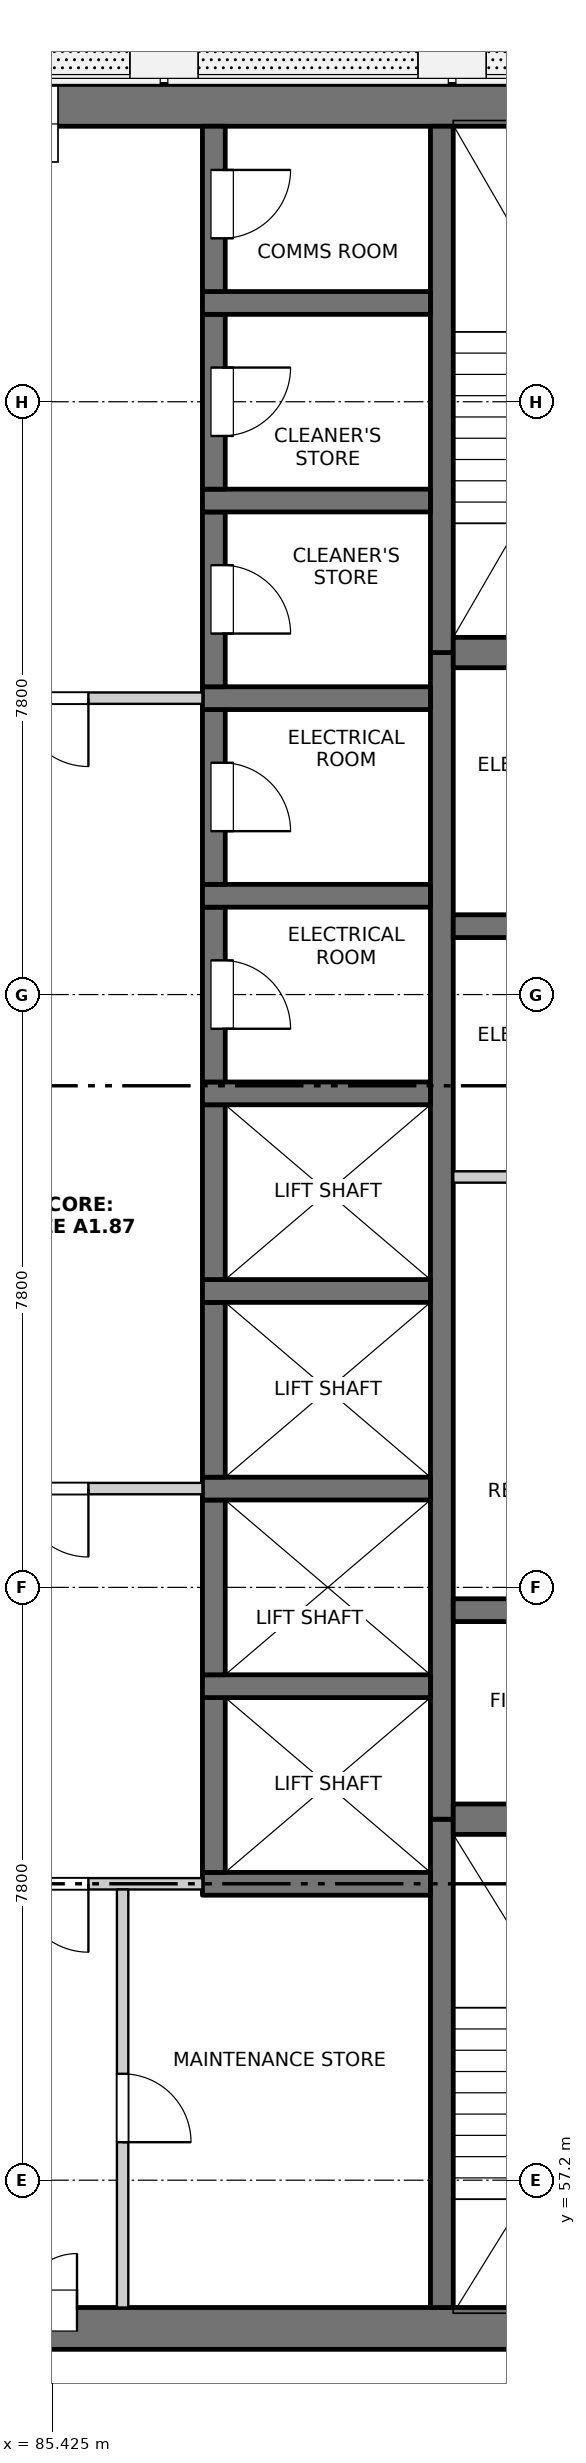
"""IFC4 building model, lengths in metres.
Left out: names, types, materials, properties, quantities, classifications, styles, units other than length and angle.
Written with IfcOpenShell. Run it as: python <this file> out.ifc"""

import sys

from ifc_helpers import new_model, si_unit, direction, frame, frame_2d, origin, place, context, subcontext, project, spatial, rectangle, extrude, element, fill, save


model = new_model("IFC4")
c1 = context("Model", 3, precision=1e-05, world=origin(), true_north=direction((0.0, 1.0)))
c2 = subcontext(c1, "Body", "Model", "MODEL_VIEW")
j1 = project(units=[si_unit("LENGTHUNIT", "METRE"), si_unit("PLANEANGLEUNIT", "RADIAN")], contexts=[c1])
p1 = place(None, origin())
s1 = spatial("IfcSite", under=j1, at=p1, CompositionType="ELEMENT")
p2 = place(p1, origin())
s2 = spatial("IfcBuilding", under=s1, at=p2, CompositionType="ELEMENT")
p3 = place(p2, frame((0.0, 0.0, 127.1)))
s3 = spatial("IfcBuildingStorey", under=s2, at=p3, CompositionType="ELEMENT", Elevation=127.1)
p4 = place(p3, frame((75.525, 55.25, -0.25), z_axis=(0.0, 0.0, 1.0), x_axis=(1.0, 0.0, 0.0)))
e1 = element("IfcWall", 1, at=p4, inside=s3, PredefinedType="SOLIDWALL", context=c2, shape_type="SweptSolid", body=[
    extrude(rectangle(XDim=18.95, YDim=0.55, at=frame_2d((9.475, 0.0))), origin(), (0.0, 0.0, 1.0), 3.4),
])
p5 = place(p4, frame((8.725, 0.0, 0.25)))
e2 = element("IfcOpeningElement", 2, at=p5, cuts=e1, PredefinedType="OPENING", context=c2, shape_type="SweptSolid", body=[
    extrude(rectangle(XDim=1.5, YDim=2.1, at=frame_2d((0.75, 1.05))), frame((0.0, 0.285, 0.0), z_axis=(0.0, -1.0, 0.0), x_axis=(1.0, 0.0, 0.0)), (0.0, 0.0, 1.0), 0.57),
])
p6 = place(p3, frame((75.525, 84.5, -0.25), z_axis=(0.0, 0.0, 1.0), x_axis=(1.0, 0.0, 0.0)))
e3 = element("IfcWall", 3, at=p6, inside=s3, PredefinedType="SOLIDWALL", context=c2, shape_type="SweptSolid", body=[
    extrude(rectangle(XDim=18.95, YDim=0.55, at=frame_2d((9.475, 0.0))), origin(), (0.0, 0.0, 1.0), 3.4),
])
p7 = place(p3, frame((90.55, 55.525, -0.25), z_axis=(0.0, 0.0, 1.0), x_axis=(0.0, 1.0, 0.0)))
e4 = element("IfcWall", 4, at=p7, inside=s3, PredefinedType="SOLIDWALL", context=c2, shape_type="SweptSolid", body=[
    extrude(rectangle(XDim=6.425, YDim=0.3, at=frame_2d((3.212, 0.0))), origin(), (0.0, 0.0, 1.0), 3.4),
])
p8 = place(p3, frame((90.55, 61.95, -0.25), z_axis=(0.0, 0.0, 1.0), x_axis=(0.0, 1.0, 0.0)))
e5 = element("IfcWall", 5, at=p8, inside=s3, PredefinedType="SOLIDWALL", context=c2, shape_type="SweptSolid", body=[
    extrude(rectangle(XDim=15.35, YDim=0.3, at=frame_2d((7.675, 0.0))), origin(), (0.0, 0.0, 1.0), 3.4),
])
p9 = place(p3, frame((90.55, 77.3, -0.25), z_axis=(0.0, 0.0, 1.0), x_axis=(0.0, 1.0, 0.0)))
e6 = element("IfcWall", 6, at=p9, inside=s3, PredefinedType="SOLIDWALL", context=c2, shape_type="SweptSolid", body=[
    extrude(rectangle(XDim=6.925, YDim=0.3, at=frame_2d((3.462, 0.0))), origin(), (0.0, 0.0, 1.0), 3.4),
])
p10 = place(p3, frame((87.4, 61.1, -0.25), z_axis=(0.0, 0.0, 1.0), x_axis=(1.0, 0.0, 0.0)))
e7 = element("IfcWall", 7, at=p10, inside=s3, PredefinedType="SOLIDWALL", context=c2, shape_type="SweptSolid", body=[
    extrude(rectangle(XDim=3.0, YDim=0.3, at=frame_2d((1.5, 0.0))), origin(), (0.0, 0.0, 1.0), 3.4),
])
p11 = place(p3, frame((87.55, 61.25, -0.25), z_axis=(0.0, 0.0, 1.0), x_axis=(0.0, 1.0, 0.0)))
e8 = element("IfcWall", 8, at=p11, inside=s3, PredefinedType="SOLIDWALL", context=c2, shape_type="SweptSolid", body=[
    extrude(rectangle(XDim=2.3, YDim=0.3, at=frame_2d((1.15, 0.0))), origin(), (0.0, 0.0, 1.0), 3.4),
])
p12 = place(p3, frame((87.4, 63.7, -0.25), z_axis=(0.0, 0.0, 1.0), x_axis=(1.0, 0.0, 0.0)))
e9 = element("IfcWall", 9, at=p12, inside=s3, PredefinedType="SOLIDWALL", context=c2, shape_type="SweptSolid", body=[
    extrude(rectangle(XDim=3.0, YDim=0.3, at=frame_2d((1.5, 0.0))), origin(), (0.0, 0.0, 1.0), 3.4),
])
p13 = place(p3, frame((87.55, 63.85, -0.25), z_axis=(0.0, 0.0, 1.0), x_axis=(0.0, 1.0, 0.0)))
e10 = element("IfcWall", 10, at=p13, inside=s3, PredefinedType="SOLIDWALL", context=c2, shape_type="SweptSolid", body=[
    extrude(rectangle(XDim=2.3, YDim=0.3, at=frame_2d((1.15, 0.0))), origin(), (0.0, 0.0, 1.0), 3.4),
])
p14 = place(p3, frame((87.4, 66.3, -0.25), z_axis=(0.0, 0.0, 1.0), x_axis=(1.0, 0.0, 0.0)))
e11 = element("IfcWall", 11, at=p14, inside=s3, PredefinedType="SOLIDWALL", context=c2, shape_type="SweptSolid", body=[
    extrude(rectangle(XDim=3.0, YDim=0.3, at=frame_2d((1.5, 0.0))), origin(), (0.0, 0.0, 1.0), 3.4),
])
p15 = place(p3, frame((87.55, 66.45, -0.25), z_axis=(0.0, 0.0, 1.0), x_axis=(0.0, 1.0, 0.0)))
e12 = element("IfcWall", 12, at=p15, inside=s3, PredefinedType="SOLIDWALL", context=c2, shape_type="SweptSolid", body=[
    extrude(rectangle(XDim=2.3, YDim=0.3, at=frame_2d((1.15, 0.0))), origin(), (0.0, 0.0, 1.0), 3.4),
])
p16 = place(p3, frame((87.4, 68.9, -0.25), z_axis=(0.0, 0.0, 1.0), x_axis=(1.0, 0.0, 0.0)))
e13 = element("IfcWall", 13, at=p16, inside=s3, PredefinedType="SOLIDWALL", context=c2, shape_type="SweptSolid", body=[
    extrude(rectangle(XDim=3.0, YDim=0.3, at=frame_2d((1.5, 0.0))), origin(), (0.0, 0.0, 1.0), 3.4),
])
p17 = place(p3, frame((87.55, 69.05, -0.25), z_axis=(0.0, 0.0, 1.0), x_axis=(0.0, 1.0, 0.0)))
e14 = element("IfcWall", 14, at=p17, inside=s3, PredefinedType="SOLIDWALL", context=c2, shape_type="SweptSolid", body=[
    extrude(rectangle(XDim=2.3, YDim=0.3, at=frame_2d((1.15, 0.0))), origin(), (0.0, 0.0, 1.0), 3.4),
])
p18 = place(p3, frame((87.4, 71.5, -0.25), z_axis=(0.0, 0.0, 1.0), x_axis=(1.0, 0.0, 0.0)))
e15 = element("IfcWall", 15, at=p18, inside=s3, PredefinedType="SOLIDWALL", context=c2, shape_type="SweptSolid", body=[
    extrude(rectangle(XDim=3.0, YDim=0.3, at=frame_2d((1.5, 0.0))), origin(), (0.0, 0.0, 1.0), 3.4),
])
p19 = place(p3, frame((87.55, 71.65, -0.25), z_axis=(0.0, 0.0, 1.0), x_axis=(0.0, 1.0, 0.0)))
e16 = element("IfcWall", 16, at=p19, inside=s3, PredefinedType="SOLIDWALL", context=c2, shape_type="SweptSolid", body=[
    extrude(rectangle(XDim=2.3, YDim=0.3, at=frame_2d((1.15, 0.0))), origin(), (0.0, 0.0, 1.0), 3.4),
])
p20 = place(p19, frame((0.7, 0.0, 0.25)))
e17 = element("IfcOpeningElement", 17, at=p20, cuts=e16, PredefinedType="OPENING", context=c2, shape_type="SweptSolid", body=[
    extrude(rectangle(XDim=0.9, YDim=2.1, at=frame_2d((0.45, 1.05))), frame((0.0, 0.16, 0.0), z_axis=(0.0, -1.0, 0.0), x_axis=(1.0, 0.0, 0.0)), (0.0, 0.0, 1.0), 0.32),
])
p21 = place(p3, frame((87.4, 74.1, -0.25), z_axis=(0.0, 0.0, 1.0), x_axis=(1.0, 0.0, 0.0)))
e18 = element("IfcWall", 18, at=p21, inside=s3, PredefinedType="SOLIDWALL", context=c2, shape_type="SweptSolid", body=[
    extrude(rectangle(XDim=3.0, YDim=0.3, at=frame_2d((1.5, 0.0))), origin(), (0.0, 0.0, 1.0), 3.4),
])
p22 = place(p3, frame((87.55, 74.25, -0.25), z_axis=(0.0, 0.0, 1.0), x_axis=(0.0, 1.0, 0.0)))
e19 = element("IfcWall", 19, at=p22, inside=s3, PredefinedType="SOLIDWALL", context=c2, shape_type="SweptSolid", body=[
    extrude(rectangle(XDim=2.3, YDim=0.3, at=frame_2d((1.15, 0.0))), origin(), (0.0, 0.0, 1.0), 3.4),
])
p23 = place(p22, frame((0.7, 0.0, 0.25)))
e20 = element("IfcOpeningElement", 20, at=p23, cuts=e19, PredefinedType="OPENING", context=c2, shape_type="SweptSolid", body=[
    extrude(rectangle(XDim=0.9, YDim=2.1, at=frame_2d((0.45, 1.05))), frame((0.0, 0.16, 0.0), z_axis=(0.0, -1.0, 0.0), x_axis=(1.0, 0.0, 0.0)), (0.0, 0.0, 1.0), 0.32),
])
p24 = place(p3, frame((87.4, 76.7, -0.25), z_axis=(0.0, 0.0, 1.0), x_axis=(1.0, 0.0, 0.0)))
e21 = element("IfcWall", 21, at=p24, inside=s3, PredefinedType="SOLIDWALL", context=c2, shape_type="SweptSolid", body=[
    extrude(rectangle(XDim=3.0, YDim=0.3, at=frame_2d((1.5, 0.0))), origin(), (0.0, 0.0, 1.0), 3.4),
])
p25 = place(p3, frame((87.55, 76.85, -0.25), z_axis=(0.0, 0.0, 1.0), x_axis=(0.0, 1.0, 0.0)))
e22 = element("IfcWall", 22, at=p25, inside=s3, PredefinedType="SOLIDWALL", context=c2, shape_type="SweptSolid", body=[
    extrude(rectangle(XDim=2.3, YDim=0.3, at=frame_2d((1.15, 0.0))), origin(), (0.0, 0.0, 1.0), 3.4),
])
p26 = place(p25, frame((0.7, 0.0, 0.25)))
e23 = element("IfcOpeningElement", 23, at=p26, cuts=e22, PredefinedType="OPENING", context=c2, shape_type="SweptSolid", body=[
    extrude(rectangle(XDim=0.9, YDim=2.1, at=frame_2d((0.45, 1.05))), frame((0.0, 0.16, 0.0), z_axis=(0.0, -1.0, 0.0), x_axis=(1.0, 0.0, 0.0)), (0.0, 0.0, 1.0), 0.32),
])
p27 = place(p3, frame((87.4, 79.3, -0.25), z_axis=(0.0, 0.0, 1.0), x_axis=(1.0, 0.0, 0.0)))
e24 = element("IfcWall", 24, at=p27, inside=s3, PredefinedType="SOLIDWALL", context=c2, shape_type="SweptSolid", body=[
    extrude(rectangle(XDim=3.0, YDim=0.3, at=frame_2d((1.5, 0.0))), origin(), (0.0, 0.0, 1.0), 3.4),
])
p28 = place(p3, frame((87.55, 79.45, -0.25), z_axis=(0.0, 0.0, 1.0), x_axis=(0.0, 1.0, 0.0)))
e25 = element("IfcWall", 25, at=p28, inside=s3, PredefinedType="SOLIDWALL", context=c2, shape_type="SweptSolid", body=[
    extrude(rectangle(XDim=2.3, YDim=0.3, at=frame_2d((1.15, 0.0))), origin(), (0.0, 0.0, 1.0), 3.4),
])
p29 = place(p28, frame((0.7, 0.0, 0.25)))
e26 = element("IfcOpeningElement", 26, at=p29, cuts=e25, PredefinedType="OPENING", context=c2, shape_type="SweptSolid", body=[
    extrude(rectangle(XDim=0.9, YDim=2.1, at=frame_2d((0.45, 1.05))), frame((0.0, 0.16, 0.0), z_axis=(0.0, -1.0, 0.0), x_axis=(1.0, 0.0, 0.0)), (0.0, 0.0, 1.0), 0.32),
])
p30 = place(p3, frame((87.4, 81.9, -0.25), z_axis=(0.0, 0.0, 1.0), x_axis=(1.0, 0.0, 0.0)))
e27 = element("IfcWall", 27, at=p30, inside=s3, PredefinedType="SOLIDWALL", context=c2, shape_type="SweptSolid", body=[
    extrude(rectangle(XDim=3.0, YDim=0.3, at=frame_2d((1.5, 0.0))), origin(), (0.0, 0.0, 1.0), 3.4),
])
p31 = place(p3, frame((87.55, 82.05, -0.25), z_axis=(0.0, 0.0, 1.0), x_axis=(0.0, 1.0, 0.0)))
e28 = element("IfcWall", 28, at=p31, inside=s3, PredefinedType="SOLIDWALL", context=c2, shape_type="SweptSolid", body=[
    extrude(rectangle(XDim=2.175, YDim=0.3, at=frame_2d((1.087, 0.0))), origin(), (0.0, 0.0, 1.0), 3.4),
])
p32 = place(p31, frame((0.7, 0.0, 0.25)))
e29 = element("IfcOpeningElement", 29, at=p32, cuts=e28, PredefinedType="OPENING", context=c2, shape_type="SweptSolid", body=[
    extrude(rectangle(XDim=0.9, YDim=2.1, at=frame_2d((0.45, 1.05))), frame((0.0, 0.16, 0.0), z_axis=(0.0, -1.0, 0.0), x_axis=(1.0, 0.0, 0.0)), (0.0, 0.0, 1.0), 0.32),
])
p33 = place(p3, frame((90.7, 61.95, -0.25), z_axis=(0.0, 0.0, 1.0), x_axis=(1.0, 0.0, 0.0)))
e30 = element("IfcWall", 30, at=p33, inside=s3, PredefinedType="SOLIDWALL", context=c2, shape_type="SweptSolid", body=[
    extrude(rectangle(XDim=3.775, YDim=0.4, at=frame_2d((1.888, 0.0))), origin(), (0.0, 0.0, 1.0), 3.4),
])
for number, where, z_axis, x_axis in (
    (31, (90.7, 64.7, -0.25), (0.0, 0.0, 1.0), (1.0, 0.0, 0.0)),
    (32, (90.7, 73.7, -0.25), (0.0, 0.0, 1.0), (1.0, 0.0, 0.0)),
):
    element("IfcWall", number, at=place(p3, frame(where, z_axis=z_axis, x_axis=x_axis)), inside=s3, PredefinedType="SOLIDWALL", context=c2, shape_type="SweptSolid", body=[
        extrude(rectangle(XDim=3.775, YDim=0.3, at=frame_2d((1.888, 0.0))), origin(), (0.0, 0.0, 1.0), 3.4),
    ])
p34 = place(p3, frame((90.7, 77.3, -0.25), z_axis=(0.0, 0.0, 1.0), x_axis=(1.0, 0.0, 0.0)))
e33 = element("IfcWall", 33, at=p34, inside=s3, PredefinedType="SOLIDWALL", context=c2, shape_type="SweptSolid", body=[
    extrude(rectangle(XDim=3.775, YDim=0.4, at=frame_2d((1.888, 0.0))), origin(), (0.0, 0.0, 1.0), 3.4),
])
p35 = place(p3, frame((82.6, 61.1, 0.0), z_axis=(0.0, 0.0, 1.0), x_axis=(1.0, 0.0, 0.0)))
e34 = element("IfcWall", 34, at=p35, inside=s3, PredefinedType="PARTITIONING", context=c2, shape_type="SweptSolid", body=[
    extrude(rectangle(XDim=4.8, YDim=0.15, at=frame_2d((2.4, 0.0))), origin(), (0.0, 0.0, 1.0), 3.15),
])
p36 = place(p35, frame((1.5, 0.0, 0.0)))
e35 = element("IfcOpeningElement", 35, at=p36, cuts=e34, PredefinedType="OPENING", context=c2, shape_type="SweptSolid", body=[
    extrude(rectangle(XDim=1.8, YDim=2.1, at=frame_2d((0.9, 1.05))), frame((0.0, 0.085, 0.0), z_axis=(0.0, -1.0, 0.0), x_axis=(1.0, 0.0, 0.0)), (0.0, 0.0, 1.0), 0.17),
])
p37 = place(p3, frame((82.6, 66.3, 0.0), z_axis=(0.0, 0.0, 1.0), x_axis=(1.0, 0.0, 0.0)))
e36 = element("IfcWall", 36, at=p37, inside=s3, PredefinedType="PARTITIONING", context=c2, shape_type="SweptSolid", body=[
    extrude(rectangle(XDim=4.8, YDim=0.15, at=frame_2d((2.4, 0.0))), origin(), (0.0, 0.0, 1.0), 3.15),
])
p38 = place(p37, frame((1.5, 0.0, 0.0)))
e37 = element("IfcOpeningElement", 37, at=p38, cuts=e36, PredefinedType="OPENING", context=c2, shape_type="SweptSolid", body=[
    extrude(rectangle(XDim=1.8, YDim=2.1, at=frame_2d((0.9, 1.05))), frame((0.0, 0.085, 0.0), z_axis=(0.0, -1.0, 0.0), x_axis=(1.0, 0.0, 0.0)), (0.0, 0.0, 1.0), 0.17),
])
p39 = place(p3, frame((90.7, 70.4, 0.0), z_axis=(0.0, 0.0, 1.0), x_axis=(1.0, 0.0, 0.0)))
e38 = element("IfcWall", 38, at=p39, inside=s3, PredefinedType="PARTITIONING", context=c2, shape_type="SweptSolid", body=[
    extrude(rectangle(XDim=3.775, YDim=0.15, at=frame_2d((1.887, 0.0))), origin(), (0.0, 0.0, 1.0), 3.15),
])
p40 = place(p3, frame((82.6, 76.7, 0.0), z_axis=(0.0, 0.0, 1.0), x_axis=(1.0, 0.0, 0.0)))
e39 = element("IfcWall", 39, at=p40, inside=s3, PredefinedType="PARTITIONING", context=c2, shape_type="SweptSolid", body=[
    extrude(rectangle(XDim=4.8, YDim=0.15, at=frame_2d((2.4, 0.0))), origin(), (0.0, 0.0, 1.0), 3.15),
])
p41 = place(p40, frame((1.5, 0.0, 0.0)))
e40 = element("IfcOpeningElement", 40, at=p41, cuts=e39, PredefinedType="OPENING", context=c2, shape_type="SweptSolid", body=[
    extrude(rectangle(XDim=1.8, YDim=2.1, at=frame_2d((0.9, 1.05))), frame((0.0, 0.085, 0.0), z_axis=(0.0, -1.0, 0.0), x_axis=(1.0, 0.0, 0.0)), (0.0, 0.0, 1.0), 0.17),
])
p42 = place(p3, frame((86.35, 55.525, 0.0), z_axis=(0.0, 0.0, 1.0), x_axis=(0.0, 1.0, 0.0)))
e41 = element("IfcWall", 41, at=p42, inside=s3, PredefinedType="PARTITIONING", context=c2, shape_type="SweptSolid", body=[
    extrude(rectangle(XDim=5.5, YDim=0.15, at=frame_2d((2.75, 0.0))), origin(), (0.0, 0.0, 1.0), 3.15),
])
p43 = place(p42, frame((2.175, 0.0, 0.0)))
e42 = element("IfcOpeningElement", 42, at=p43, cuts=e41, PredefinedType="OPENING", context=c2, shape_type="SweptSolid", body=[
    extrude(rectangle(XDim=0.9, YDim=2.1, at=frame_2d((0.45, 1.05))), frame((0.0, 0.085, 0.0), z_axis=(0.0, -1.0, 0.0), x_axis=(1.0, 0.0, 0.0)), (0.0, 0.0, 1.0), 0.17),
])
p44 = place(p5, origin())
e43 = element("IfcDoor", 43, at=p44, inside=s3, OperationType="DOUBLE_DOOR_SINGLE_SWING", PredefinedType="DOOR", context=c2, shape_type="SweptSolid", body=[
    extrude(rectangle(XDim=1.5, YDim=2.1, at=frame_2d((0.75, 1.05))), frame((0.0, 0.26, 0.0), z_axis=(0.0, -1.0, 0.0), x_axis=(1.0, 0.0, 0.0)), (0.0, 0.0, 1.0), 0.05),
])
fill(e2, e43)
p45 = place(p43, origin())
e44 = element("IfcDoor", 44, at=p45, inside=s3, OperationType="SINGLE_SWING_RIGHT", PredefinedType="DOOR", context=c2, shape_type="SweptSolid", body=[
    extrude(rectangle(XDim=0.9, YDim=2.1, at=frame_2d((0.45, 1.05))), frame((0.0, 0.025, 0.0), z_axis=(0.0, -1.0, 0.0), x_axis=(1.0, 0.0, 0.0)), (0.0, 0.0, 1.0), 0.05),
])
fill(e42, e44)
p46 = place(p36, origin())
e45 = element("IfcDoor", 45, at=p46, inside=s3, OperationType="DOUBLE_DOOR_SINGLE_SWING", PredefinedType="DOOR", context=c2, shape_type="SweptSolid", body=[
    extrude(rectangle(XDim=1.8, YDim=2.1, at=frame_2d((0.9, 1.05))), frame((0.0, 0.025, 0.0), z_axis=(0.0, -1.0, 0.0), x_axis=(1.0, 0.0, 0.0)), (0.0, 0.0, 1.0), 0.05),
])
fill(e35, e45)
p47 = place(p38, origin())
e46 = element("IfcDoor", 46, at=p47, inside=s3, OperationType="DOUBLE_DOOR_SINGLE_SWING", PredefinedType="DOOR", context=c2, shape_type="SweptSolid", body=[
    extrude(rectangle(XDim=1.8, YDim=2.1, at=frame_2d((0.9, 1.05))), frame((0.0, 0.025, 0.0), z_axis=(0.0, -1.0, 0.0), x_axis=(1.0, 0.0, 0.0)), (0.0, 0.0, 1.0), 0.05),
])
fill(e37, e46)
p48 = place(p20, origin())
e47 = element("IfcDoor", 47, at=p48, inside=s3, OperationType="SINGLE_SWING_RIGHT", PredefinedType="DOOR", context=c2, shape_type="SweptSolid", body=[
    extrude(rectangle(XDim=0.9, YDim=2.1, at=frame_2d((0.45, 1.05))), frame((0.0, -0.085, 0.0), z_axis=(0.0, -1.0, 0.0), x_axis=(1.0, 0.0, 0.0)), (0.0, 0.0, 1.0), 0.05),
])
fill(e17, e47)
p49 = place(p23, origin())
e48 = element("IfcDoor", 48, at=p49, inside=s3, OperationType="SINGLE_SWING_RIGHT", PredefinedType="DOOR", context=c2, shape_type="SweptSolid", body=[
    extrude(rectangle(XDim=0.9, YDim=2.1, at=frame_2d((0.45, 1.05))), frame((0.0, -0.085, 0.0), z_axis=(0.0, -1.0, 0.0), x_axis=(1.0, 0.0, 0.0)), (0.0, 0.0, 1.0), 0.05),
])
fill(e20, e48)
p50 = place(p41, origin())
e49 = element("IfcDoor", 49, at=p50, inside=s3, OperationType="DOUBLE_DOOR_SINGLE_SWING", PredefinedType="DOOR", context=c2, shape_type="SweptSolid", body=[
    extrude(rectangle(XDim=1.8, YDim=2.1, at=frame_2d((0.9, 1.05))), frame((0.0, 0.025, 0.0), z_axis=(0.0, -1.0, 0.0), x_axis=(1.0, 0.0, 0.0)), (0.0, 0.0, 1.0), 0.05),
])
fill(e40, e49)
p51 = place(p26, origin())
e50 = element("IfcDoor", 50, at=p51, inside=s3, OperationType="SINGLE_SWING_RIGHT", PredefinedType="DOOR", context=c2, shape_type="SweptSolid", body=[
    extrude(rectangle(XDim=0.9, YDim=2.1, at=frame_2d((0.45, 1.05))), frame((0.0, -0.085, 0.0), z_axis=(0.0, -1.0, 0.0), x_axis=(1.0, 0.0, 0.0)), (0.0, 0.0, 1.0), 0.05),
])
fill(e23, e50)
p52 = place(p29, origin())
e51 = element("IfcDoor", 51, at=p52, inside=s3, OperationType="SINGLE_SWING_LEFT", PredefinedType="DOOR", context=c2, shape_type="SweptSolid", body=[
    extrude(rectangle(XDim=0.9, YDim=2.1, at=frame_2d((0.45, 1.05))), frame((0.0, -0.085, 0.0), z_axis=(0.0, -1.0, 0.0), x_axis=(1.0, 0.0, 0.0)), (0.0, 0.0, 1.0), 0.05),
])
fill(e26, e51)
p53 = place(p32, origin())
e52 = element("IfcDoor", 52, at=p53, inside=s3, OperationType="SINGLE_SWING_LEFT", PredefinedType="DOOR", context=c2, shape_type="SweptSolid", body=[
    extrude(rectangle(XDim=0.9, YDim=2.1, at=frame_2d((0.45, 1.05))), frame((0.0, -0.085, 0.0), z_axis=(0.0, -1.0, 0.0), x_axis=(1.0, 0.0, 0.0)), (0.0, 0.0, 1.0), 0.05),
])
fill(e29, e52)
save(model, sys.argv[1])
